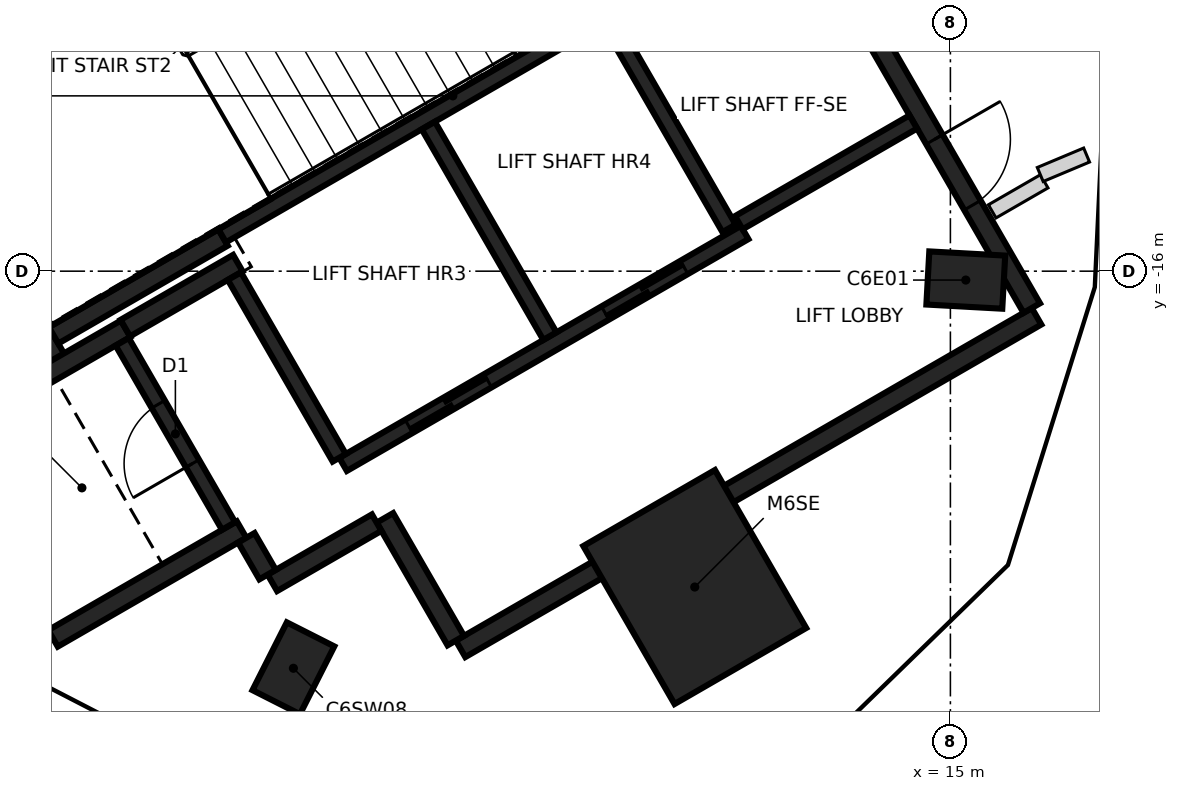
"""IFC4 building model, lengths in metres.
Left out: names, types, materials, properties, quantities, classifications, styles, units other than length and angle.
Written with IfcOpenShell. Run it as: python <this file> out.ifc"""

import sys

from ifc_helpers import new_model, si_unit, direction, frame, frame_2d, origin, origin_2d, place, context, subcontext, project, spatial, rectangle, extrude, element, fill, save


model = new_model("IFC4")
c1 = context("Model", 3, precision=1e-05, world=origin(), true_north=direction((0.0, 1.0)))
c2 = subcontext(c1, "Body", "Model", "MODEL_VIEW")
j1 = project(units=[si_unit("LENGTHUNIT", "METRE"), si_unit("PLANEANGLEUNIT", "RADIAN")], contexts=[c1])
p1 = place(None, origin())
s1 = spatial("IfcSite", under=j1, at=p1, CompositionType="ELEMENT")
p2 = place(p1, origin())
s2 = spatial("IfcBuilding", under=s1, at=p2, CompositionType="ELEMENT")
p3 = place(p2, frame((0.0, 0.0, 298.2)))
s3 = spatial("IfcBuildingStorey", under=s2, at=p3, CompositionType="ELEMENT", Elevation=298.2)
for number, where, z_axis, x_axis in (
    (1, (15.202, -16.117, -0.35), (0.0, 0.0, 1.0), (-0.998, 0.055, 0.0)),
    (2, (6.356, -21.224, -0.35), (0.0, 0.0, 1.0), (0.452, 0.892, 0.0)),
):
    element("IfcColumn", number, at=place(p3, frame(where, z_axis=z_axis, x_axis=x_axis)), inside=s3, PredefinedType="COLUMN", context=c2, shape_type="SweptSolid", body=[
        extrude(rectangle(XDim=1.0, YDim=0.7, at=origin_2d()), origin(), (0.0, 0.0, 1.0), 2.64),
    ])
p4 = place(p3, frame((11.637, -20.155, -0.35), z_axis=(0.0, 0.0, 1.0), x_axis=(-0.5, 0.866025403784, 0.0)))
e3 = element("IfcColumn", 3, at=p4, inside=s3, PredefinedType="COLUMN", context=c2, shape_type="SweptSolid", body=[
    extrude(rectangle(XDim=2.4, YDim=2.0, at=origin_2d()), origin(), (0.0, 0.0, 1.0), 3.55),
])
p5 = place(p3, frame((16.133, -16.594, 0.0), z_axis=(0.0, 0.0, 1.0), x_axis=(-0.866022959057, -0.500004234368, 0.0)))
e4 = element("IfcWall", 4, at=p5, inside=s3, PredefinedType="SHEAR", context=c2, shape_type="SweptSolid", body=[
    extrude(rectangle(XDim=8.75, YDim=0.25, at=frame_2d((4.375, 0.0))), origin(), (0.0, 0.0, 1.0), 3.2),
])
p6 = place(p3, frame((13.008, -11.181, 0.0), z_axis=(0.0, 0.0, 1.0), x_axis=(0.500001955336, -0.866024274868, 0.0)))
e5 = element("IfcWall", 5, at=p6, inside=s3, PredefinedType="SHEAR", context=c2, shape_type="SweptSolid", body=[
    extrude(rectangle(XDim=6.125, YDim=0.25, at=frame_2d((3.062, 0.0))), origin(), (0.0, 0.0, 1.0), 3.2),
])
p7 = place(p6, frame((3.563, 0.0, 0.0)))
e6 = element("IfcOpeningElement", 6, at=p7, cuts=e5, PredefinedType="OPENING", context=c2, shape_type="SweptSolid", body=[
    extrude(rectangle(XDim=1.0, YDim=2.1, at=frame_2d((0.5, 1.05))), frame((0.0, 0.135, 0.0), z_axis=(0.0, -1.0, 0.0), x_axis=(1.0, 0.0, 0.0)), (0.0, 0.0, 1.0), 0.27),
])
p8 = place(p3, frame((3.235, -17.153, 0.0), z_axis=(0.0, 0.0, 1.0), x_axis=(-0.500008851346, 0.866020293397, 0.0)))
e7 = element("IfcWall", 7, at=p8, inside=s3, PredefinedType="SHEAR", context=c2, shape_type="SweptSolid", body=[
    extrude(rectangle(XDim=5.51, YDim=0.25, at=frame_2d((2.755, 0.0))), origin(), (0.0, 0.0, 1.0), 3.2),
])
p9 = place(p3, frame((3.085, -20.894, 0.0), z_axis=(0.0, 0.0, 1.0), x_axis=(-0.499978833458, 0.866037623948, 0.0)))
e8 = element("IfcWall", 8, at=p9, inside=s3, PredefinedType="SHEAR", context=c2, shape_type="SweptSolid", body=[
    extrude(rectangle(XDim=3.05, YDim=0.25, at=frame_2d((1.525, 0.0))), origin(), (0.0, 0.0, 1.0), 3.2),
])
p10 = place(p3, frame((1.669, -18.19, 0.0), z_axis=(0.0, 0.0, 1.0), x_axis=(0.866042235819, 0.499970844928, 0.0)))
e9 = element("IfcWall", 9, at=p10, inside=s3, PredefinedType="SHEAR", context=c2, shape_type="SweptSolid", body=[
    extrude(rectangle(XDim=2.865, YDim=0.25, at=frame_2d((1.432, 0.0))), origin(), (0.0, 0.0, 1.0), 3.2),
])
p11 = place(p3, frame((5.675, -19.399, 0.0), z_axis=(0.0, 0.0, 1.0), x_axis=(-0.866026637627, -0.499997862916, 0.0)))
e10 = element("IfcWall", 10, at=p11, inside=s3, PredefinedType="SHEAR", context=c2, shape_type="SweptSolid", body=[
    extrude(rectangle(XDim=2.865, YDim=0.25, at=frame_2d((1.432, 0.0))), origin(), (0.0, 0.0, 1.0), 3.2),
])
p12 = place(p3, frame((5.431, -15.556, 0.0), z_axis=(0.0, 0.0, 1.0), x_axis=(-0.866022940537, -0.500004266446, 0.0)))
e11 = element("IfcWall", 11, at=p12, inside=s3, PredefinedType="SHEAR", context=c2, shape_type="SweptSolid", body=[
    extrude(rectangle(XDim=2.575, YDim=0.25, at=frame_2d((1.287, 0.0))), origin(), (0.0, 0.0, 1.0), 3.2),
])
p13 = place(p3, frame((8.493, -20.86, 0.0), z_axis=(0.0, 0.0, 1.0), x_axis=(-0.500039802285, 0.866002422705, 0.0)))
e12 = element("IfcWall", 12, at=p13, inside=s3, PredefinedType="SHEAR", context=c2, shape_type="SweptSolid", body=[
    extrude(rectangle(XDim=1.865, YDim=0.25, at=frame_2d((0.932, 0.0))), origin(), (0.0, 0.0, 1.0), 3.2),
])
p14 = place(p3, frame((4.145, -16.749, 0.0), z_axis=(0.0, 0.0, 1.0), x_axis=(0.866038183914, 0.499977863513, 0.0)))
e13 = element("IfcWall", 13, at=p14, inside=s3, PredefinedType="SHEAR", context=c2, shape_type="SweptSolid", body=[
    extrude(rectangle(XDim=1.71, YDim=0.25, at=frame_2d((0.855, 0.0))), origin(), (0.0, 0.0, 1.0), 3.2),
])
p15 = place(p3, frame((7.452, -19.308, 0.0), z_axis=(0.0, 0.0, 1.0), x_axis=(-0.866044474677, -0.49996696679, 0.0)))
e14 = element("IfcWall", 14, at=p15, inside=s3, PredefinedType="SHEAR", context=c2, shape_type="SweptSolid", body=[
    extrude(rectangle(XDim=1.584, YDim=0.25, at=frame_2d((0.792, 0.0))), origin(), (0.0, 0.0, 1.0), 3.2),
])
p16 = place(p3, frame((6.017, -19.992, 0.0), z_axis=(0.0, 0.0, 1.0), x_axis=(-0.500364886717, 0.865814633822, 0.0)))
e15 = element("IfcWall", 15, at=p16, inside=s3, PredefinedType="SHEAR", context=c2, shape_type="SweptSolid", body=[
    extrude(rectangle(XDim=0.559, YDim=0.25, at=frame_2d((0.28, 0.0))), origin(), (0.0, 0.0, 1.0), 3.2),
])
p17 = place(p3, frame((5.419, -15.534, 0.0), z_axis=(0.0, 0.0, 1.0), x_axis=(0.866029065029, 0.499993658486, 0.0)))
e16 = element("IfcWall", 16, at=p17, inside=s3, PredefinedType="SHEAR", context=c2, shape_type="SweptSolid", body=[
    extrude(rectangle(XDim=5.974, YDim=0.2, at=frame_2d((2.987, 0.0))), origin(), (0.0, 0.0, 1.0), 3.2),
])
p18 = place(p3, frame((7.01, -18.542, 0.0), z_axis=(0.0, 0.0, 1.0), x_axis=(0.866030299012, 0.499991521122, 0.0)))
e17 = element("IfcWall", 17, at=p18, inside=s3, PredefinedType="SHEAR", context=c2, shape_type="SweptSolid", body=[
    extrude(rectangle(XDim=6.1, YDim=0.2, at=frame_2d((3.05, 0.0))), origin(), (0.0, 0.0, 1.0), 3.2),
])
p19 = place(p18, frame((1.0, 0.0, 0.0)))
e18 = element("IfcOpeningElement", 18, at=p19, cuts=e17, PredefinedType="OPENING", context=c2, shape_type="SweptSolid", body=[
    extrude(rectangle(XDim=1.2, YDim=2.1, at=frame_2d((0.6, 1.05))), frame((0.0, 0.11, 0.0), z_axis=(0.0, -1.0, 0.0), x_axis=(1.0, 0.0, 0.0)), (0.0, 0.0, 1.0), 0.22),
])
p20 = place(p18, frame((3.982, 0.0, 0.0)))
e19 = element("IfcOpeningElement", 19, at=p20, cuts=e17, PredefinedType="OPENING", context=c2, shape_type="SweptSolid", body=[
    extrude(rectangle(XDim=1.2, YDim=2.1, at=frame_2d((0.6, 1.05))), frame((0.0, 0.11, 0.0), z_axis=(0.0, -1.0, 0.0), x_axis=(1.0, 0.0, 0.0)), (0.0, 0.0, 1.0), 0.22),
])
p21 = place(p3, frame((8.132, -14.084, 0.0), z_axis=(0.0, 0.0, 1.0), x_axis=(0.499997778408, -0.866026686418, 0.0)))
e20 = element("IfcWall", 20, at=p21, inside=s3, PredefinedType="SHEAR", context=c2, shape_type="SweptSolid", body=[
    extrude(rectangle(XDim=3.198, YDim=0.2, at=frame_2d((1.599, 0.0))), origin(), (0.0, 0.0, 1.0), 3.2),
])
p22 = place(p3, frame((5.503, -19.352, 0.0), z_axis=(0.0, 0.0, 1.0), x_axis=(-0.499986818241, 0.866033014143, 0.0)))
e21 = element("IfcWall", 21, at=p22, inside=s3, PredefinedType="SHEAR", context=c2, shape_type="SweptSolid", body=[
    extrude(rectangle(XDim=2.798, YDim=0.2, at=frame_2d((1.399, 0.0))), origin(), (0.0, 0.0, 1.0), 3.2),
])
p23 = place(p22, frame((0.949, 0.0, 0.0)))
e22 = element("IfcOpeningElement", 22, at=p23, cuts=e21, PredefinedType="OPENING", context=c2, shape_type="SweptSolid", body=[
    extrude(rectangle(XDim=0.9, YDim=2.1, at=frame_2d((0.45, 1.05))), frame((0.0, 0.11, 0.0), z_axis=(0.0, -1.0, 0.0), x_axis=(1.0, 0.0, 0.0)), (0.0, 0.0, 1.0), 0.22),
])
p24 = place(p3, frame((6.96, -18.455, 0.0), z_axis=(0.0, 0.0, 1.0), x_axis=(-0.499926705758, 0.866067716099, 0.0)))
e23 = element("IfcWall", 23, at=p24, inside=s3, PredefinedType="SHEAR", context=c2, shape_type="SweptSolid", body=[
    extrude(rectangle(XDim=2.759, YDim=0.2, at=frame_2d((1.38, 0.0))), origin(), (0.0, 0.0, 1.0), 3.2),
])
p25 = place(p3, frame((12.088, -15.437, 0.0), z_axis=(0.0, 0.0, 1.0), x_axis=(-0.500026960575, 0.86600983753, 0.0)))
e24 = element("IfcWall", 24, at=p25, inside=s3, PredefinedType="SHEAR", context=c2, shape_type="SweptSolid", body=[
    extrude(rectangle(XDim=3.1, YDim=0.2, at=frame_2d((1.55, 0.0))), origin(), (0.0, 0.0, 1.0), 3.2),
])
p26 = place(p3, frame((14.512, -14.037, 0.0), z_axis=(0.0, 0.0, 1.0), x_axis=(-0.866018407898, -0.500012117035, 0.0)))
e25 = element("IfcWall", 25, at=p26, inside=s3, PredefinedType="SHEAR", context=c2, shape_type="SweptSolid", body=[
    extrude(rectangle(XDim=2.651, YDim=0.2, at=frame_2d((1.325, 0.0))), origin(), (0.0, 0.0, 1.0), 3.2),
])
p27 = place(p3, frame((15.55, -15.213, 0.0), z_axis=(0.0, 0.0, 1.0), x_axis=(0.865989998118, 0.500061319399, 0.0)))
e26 = element("IfcWall", 26, at=p27, inside=s3, PredefinedType="PARTITIONING", context=c2, shape_type="SweptSolid", body=[
    extrude(rectangle(XDim=0.79, YDim=0.2, at=frame_2d((0.395, 0.0))), origin(), (0.0, 0.0, 1.0), 3.2),
])
p28 = place(p3, frame((16.182, -14.728, 0.0), z_axis=(0.0, 0.0, 1.0), x_axis=(0.922058491377, 0.387050563207, 0.0)))
e27 = element("IfcWall", 27, at=p28, inside=s3, PredefinedType="PARTITIONING", context=c2, shape_type="SweptSolid", body=[
    extrude(rectangle(XDim=0.662, YDim=0.2, at=frame_2d((0.331, 0.0))), origin(), (0.0, 0.0, 1.0), 3.2),
])
p29 = place(p19, origin())
e28 = element("IfcDoor", 28, at=p29, inside=s3, OperationType="DOUBLE_DOOR_SLIDING", PredefinedType="DOOR", context=c2, shape_type="SweptSolid", body=[
    extrude(rectangle(XDim=1.2, YDim=2.1, at=frame_2d((0.6, 1.05))), frame((0.0, 0.025, 0.0), z_axis=(0.0, -1.0, 0.0), x_axis=(1.0, 0.0, 0.0)), (0.0, 0.0, 1.0), 0.05),
])
fill(e18, e28)
p30 = place(p20, origin())
e29 = element("IfcDoor", 29, at=p30, inside=s3, OperationType="DOUBLE_DOOR_SLIDING", PredefinedType="DOOR", context=c2, shape_type="SweptSolid", body=[
    extrude(rectangle(XDim=1.2, YDim=2.1, at=frame_2d((0.6, 1.05))), frame((0.0, 0.025, 0.0), z_axis=(0.0, -1.0, 0.0), x_axis=(1.0, 0.0, 0.0)), (0.0, 0.0, 1.0), 0.05),
])
fill(e19, e29)
p31 = place(p7, origin())
e30 = element("IfcDoor", 30, at=p31, inside=s3, OperationType="SINGLE_SWING_LEFT", PredefinedType="DOOR", context=c2, shape_type="SweptSolid", body=[
    extrude(rectangle(XDim=1.0, YDim=2.1, at=frame_2d((0.5, 1.05))), frame((0.0, 0.025, 0.0), z_axis=(0.0, -1.0, 0.0), x_axis=(1.0, 0.0, 0.0)), (0.0, 0.0, 1.0), 0.05),
])
fill(e6, e30)
p32 = place(p23, origin())
e31 = element("IfcDoor", 31, at=p32, inside=s3, OperationType="SINGLE_SWING_LEFT", PredefinedType="DOOR", context=c2, shape_type="SweptSolid", body=[
    extrude(rectangle(XDim=0.9, YDim=2.1, at=frame_2d((0.45, 1.05))), frame((0.0, 0.025, 0.0), z_axis=(0.0, -1.0, 0.0), x_axis=(1.0, 0.0, 0.0)), (0.0, 0.0, 1.0), 0.05),
])
fill(e22, e31)
save(model, sys.argv[1])
